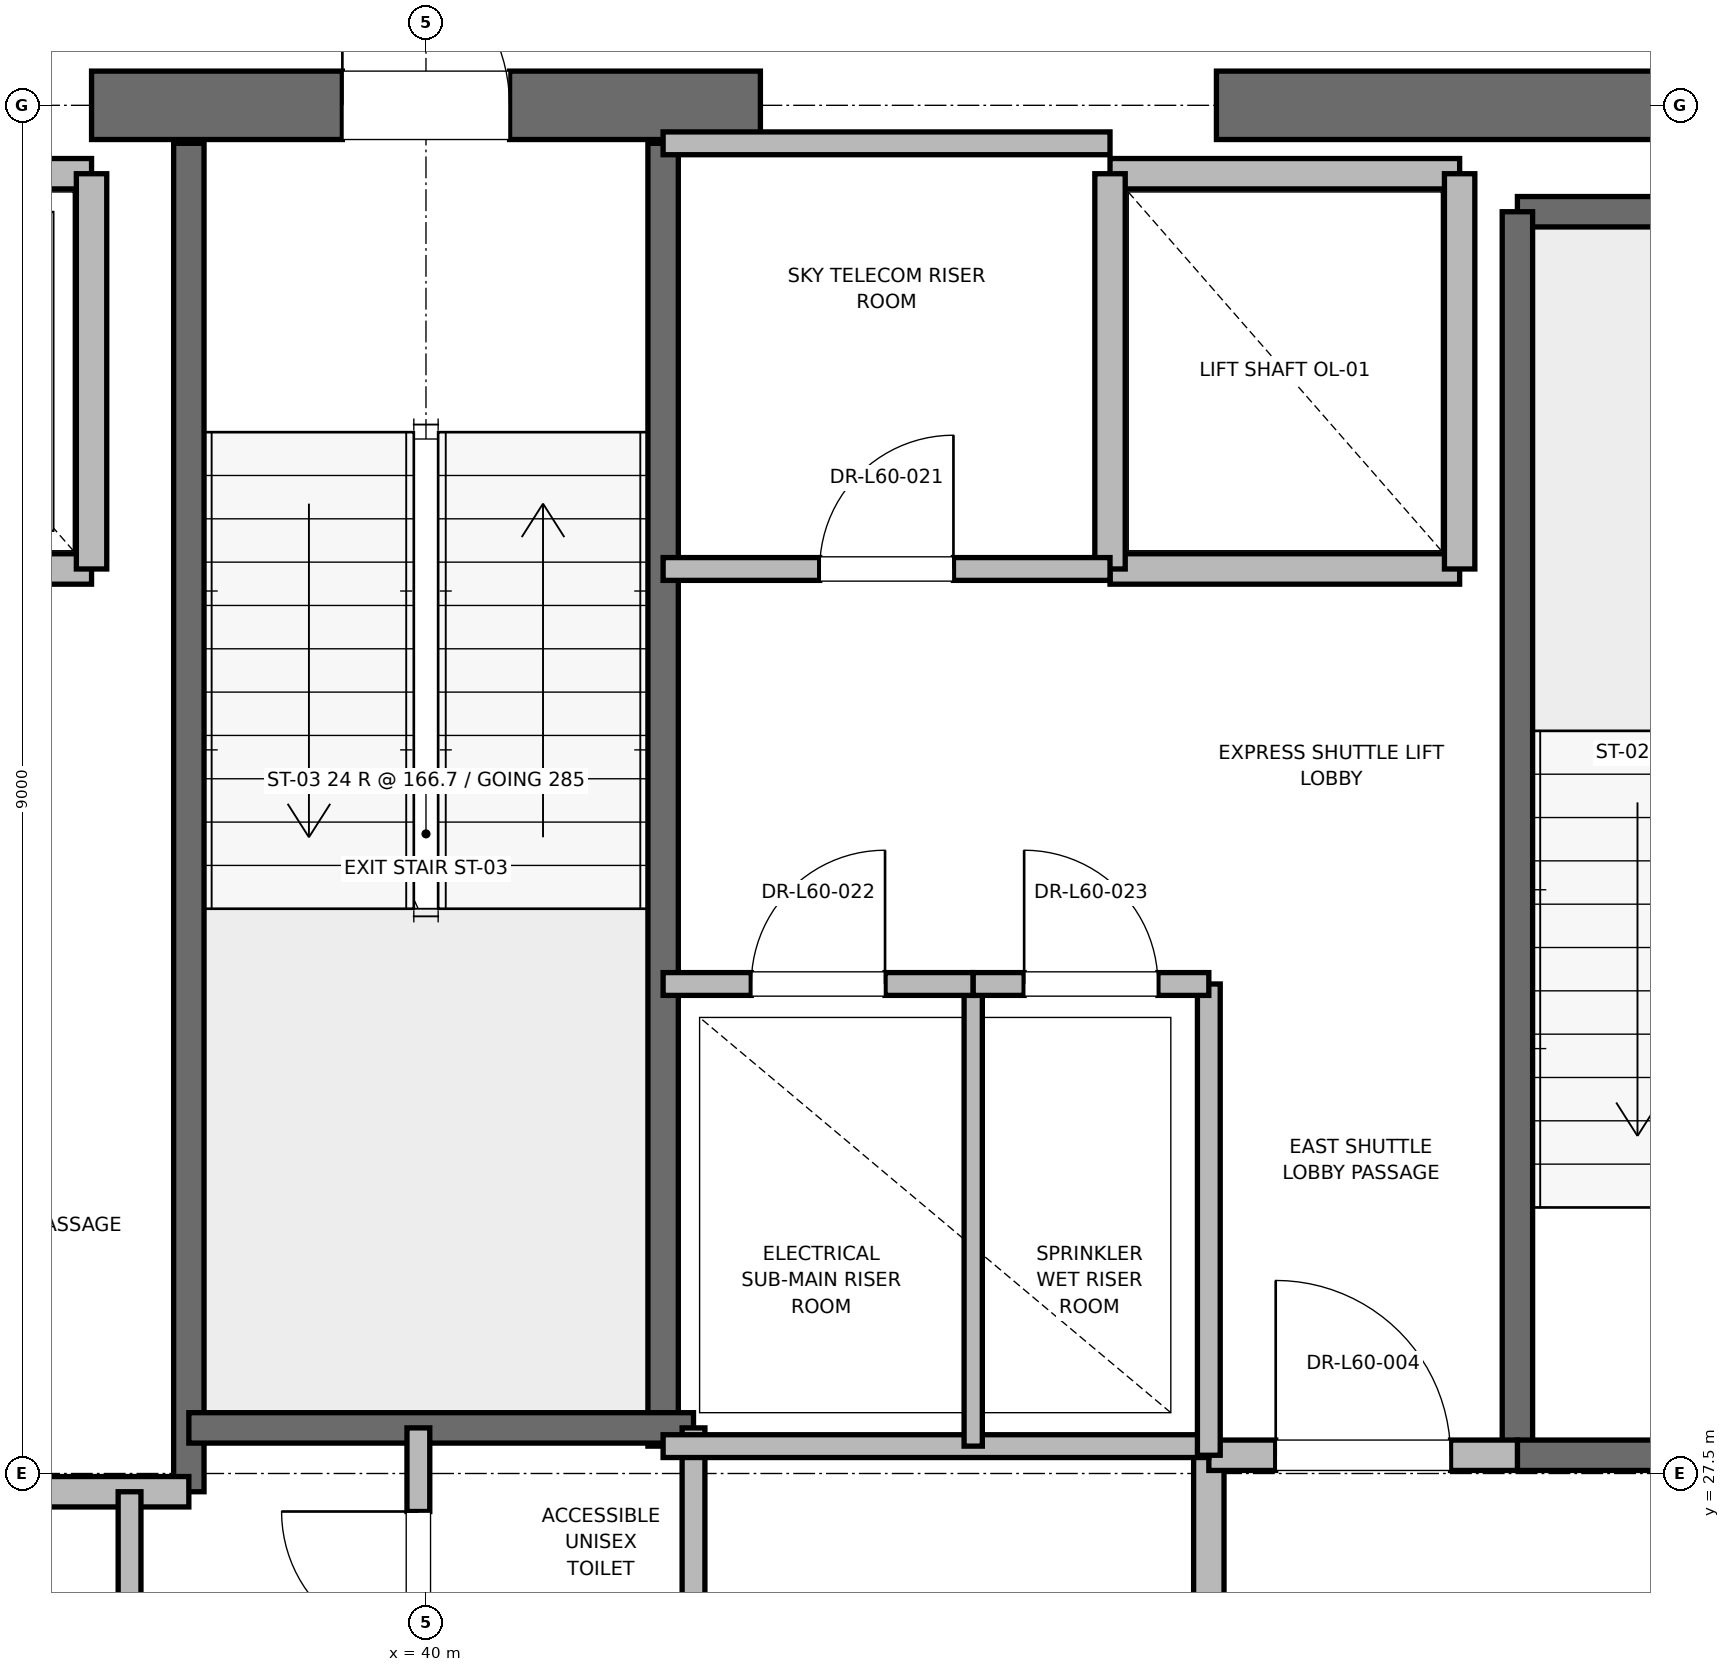
"""IFC4 building model, lengths in metres.
Left out: names, types, materials, properties, quantities, classifications, styles, units other than length and angle.
Written with IfcOpenShell. Run it as: python <this file> out.ifc"""

import sys

from ifc_helpers import new_model, si_unit, direction, frame, frame_2d, origin, place, context, subcontext, project, spatial, rectangle, extrude, element, fill, save


model = new_model("IFC4")
c1 = context("Model", 3, precision=1e-05, world=origin(), true_north=direction((0.0, 1.0)))
c2 = subcontext(c1, "Body", "Model", "MODEL_VIEW")
j1 = project(units=[si_unit("LENGTHUNIT", "METRE"), si_unit("PLANEANGLEUNIT", "RADIAN")], contexts=[c1])
p1 = place(None, origin())
s1 = spatial("IfcSite", under=j1, at=p1, CompositionType="ELEMENT")
p2 = place(p1, origin())
s2 = spatial("IfcBuilding", under=s1, at=p2, CompositionType="ELEMENT")
p3 = place(p2, frame((0.0, 0.0, 259.2)))
s3 = spatial("IfcBuildingStorey", under=s2, at=p3, CompositionType="ELEMENT", Elevation=259.2)
p4 = place(p3, frame((37.8, 36.5, 0.0), z_axis=(0.0, 0.0, 1.0), x_axis=(1.0, 0.0, 0.0)))
e1 = element("IfcWall", 1, at=p4, inside=s3, PredefinedType="SHEAR", context=c2, shape_type="SweptSolid", body=[
    extrude(rectangle(XDim=4.4, YDim=0.45, at=frame_2d((2.2, 0.0))), origin(), (0.0, 0.0, 1.0), 3.785),
])
p5 = place(p4, frame((1.65, 0.0, 0.0)))
e2 = element("IfcOpeningElement", 2, at=p5, cuts=e1, PredefinedType="OPENING", context=c2, shape_type="SweptSolid", body=[
    extrude(rectangle(XDim=1.1, YDim=2.15, at=frame_2d((0.55, 1.075))), frame((0.0, 0.225, 0.0), z_axis=(0.0, -1.0, 0.0), x_axis=(1.0, 0.0, 0.0)), (0.0, 0.0, 1.0), 0.45),
])
p6 = place(p3, frame((45.2, 36.5, 0.0), z_axis=(0.0, 0.0, 1.0), x_axis=(1.0, 0.0, 0.0)))
e3 = element("IfcWall", 3, at=p6, inside=s3, PredefinedType="SHEAR", context=c2, shape_type="SweptSolid", body=[
    extrude(rectangle(XDim=5.8, YDim=0.45, at=frame_2d((2.9, 0.0))), origin(), (0.0, 0.0, 1.0), 3.785),
])
p7 = place(p3, frame((47.18, 35.8, 0.0), z_axis=(0.0, 0.0, 1.0), x_axis=(1.0, 0.0, 0.0)))
e4 = element("IfcWall", 4, at=p7, inside=s3, PredefinedType="SOLIDWALL", context=c2, shape_type="SweptSolid", body=[
    extrude(rectangle(XDim=3.12, YDim=0.2, at=frame_2d((1.56, 0.0))), origin(), (0.0, 0.0, 1.0), 3.785),
])
p8 = place(p3, frame((47.18, 27.62, 0.0), z_axis=(0.0, 0.0, 1.0), x_axis=(0.0, 1.0, 0.0)))
e5 = element("IfcWall", 5, at=p8, inside=s3, PredefinedType="SOLIDWALL", context=c2, shape_type="SweptSolid", body=[
    extrude(rectangle(XDim=8.18, YDim=0.2, at=frame_2d((4.09, 0.0))), origin(), (0.0, 0.0, 1.0), 3.785),
])
p9 = place(p3, frame((47.18, 27.62, 0.0), z_axis=(0.0, 0.0, 1.0), x_axis=(1.0, 0.0, 0.0)))
e6 = element("IfcWall", 6, at=p9, inside=s3, PredefinedType="SOLIDWALL", context=c2, shape_type="SweptSolid", body=[
    extrude(rectangle(XDim=3.12, YDim=0.2, at=frame_2d((1.56, 0.0))), origin(), (0.0, 0.0, 1.0), 3.785),
])
p10 = place(p9, frame((1.01, 0.0, 0.0)))
e7 = element("IfcOpeningElement", 7, at=p10, cuts=e6, PredefinedType="OPENING", context=c2, shape_type="SweptSolid", body=[
    extrude(rectangle(XDim=1.1, YDim=2.15, at=frame_2d((0.55, 1.075))), frame((0.0, 0.1, 0.0), z_axis=(0.0, -1.0, 0.0), x_axis=(1.0, 0.0, 0.0)), (0.0, 0.0, 1.0), 0.2),
])
p11 = place(p3, frame((38.44, 27.38, 0.0), z_axis=(0.0, 0.0, 1.0), x_axis=(0.0, 1.0, 0.0)))
e8 = element("IfcWall", 8, at=p11, inside=s3, PredefinedType="SOLIDWALL", context=c2, shape_type="SweptSolid", body=[
    extrude(rectangle(XDim=8.87, YDim=0.2, at=frame_2d((4.435, 0.0))), origin(), (0.0, 0.0, 1.0), 3.785),
])
p12 = place(p3, frame((41.56, 27.68, 0.0), z_axis=(0.0, 0.0, 1.0), x_axis=(0.0, 1.0, 0.0)))
e9 = element("IfcWall", 9, at=p12, inside=s3, PredefinedType="SOLIDWALL", context=c2, shape_type="SweptSolid", body=[
    extrude(rectangle(XDim=8.57, YDim=0.2, at=frame_2d((4.285, 0.0))), origin(), (0.0, 0.0, 1.0), 3.785),
])
p13 = place(p3, frame((38.44, 27.8, 0.0), z_axis=(0.0, 0.0, 1.0), x_axis=(1.0, 0.0, 0.0)))
e10 = element("IfcWall", 10, at=p13, inside=s3, PredefinedType="SOLIDWALL", context=c2, shape_type="SweptSolid", body=[
    extrude(rectangle(XDim=3.32, YDim=0.2, at=frame_2d((1.66, 0.0))), origin(), (0.0, 0.0, 1.0), 3.785),
])
p14 = place(p3, frame((32.82, 27.38, 0.0), z_axis=(0.0, 0.0, 1.0), x_axis=(1.0, 0.0, 0.0)))
e11 = element("IfcWall", 11, at=p14, inside=s3, PredefinedType="PARTITIONING", context=c2, shape_type="SweptSolid", body=[
    extrude(rectangle(XDim=5.62, YDim=0.2, at=frame_2d((2.81, 0.0))), origin(), (0.0, 0.0, 1.0), 3.785),
])
p15 = place(p3, frame((45.15, 24.25, 0.0), z_axis=(0.0, 0.0, 1.0), x_axis=(0.0, 1.0, 0.0)))
e12 = element("IfcWall", 12, at=p15, inside=s3, PredefinedType="PARTITIONING", context=c2, shape_type="SweptSolid", body=[
    extrude(rectangle(XDim=3.37, YDim=0.2, at=frame_2d((1.685, 0.0))), origin(), (0.0, 0.0, 1.0), 3.785),
])
p16 = place(p3, frame((45.15, 27.62, 0.0), z_axis=(0.0, 0.0, 1.0), x_axis=(1.0, 0.0, 0.0)))
e13 = element("IfcWall", 13, at=p16, inside=s3, PredefinedType="PARTITIONING", context=c2, shape_type="SweptSolid", body=[
    extrude(rectangle(XDim=2.03, YDim=0.2, at=frame_2d((1.015, 0.0))), origin(), (0.0, 0.0, 1.0), 3.785),
])
p17 = place(p16, frame((0.44, 0.0, 0.0)))
e14 = element("IfcOpeningElement", 14, at=p17, cuts=e13, PredefinedType="OPENING", context=c2, shape_type="SweptSolid", body=[
    extrude(rectangle(XDim=1.15, YDim=2.2, at=frame_2d((0.575, 1.1))), frame((0.0, 0.1, 0.0), z_axis=(0.0, -1.0, 0.0), x_axis=(1.0, 0.0, 0.0)), (0.0, 0.0, 1.0), 0.2),
])
p18 = place(p3, frame((35.5, 33.45, 0.0), z_axis=(0.0, 0.0, 1.0), x_axis=(1.0, 0.0, 0.0)))
e15 = element("IfcWall", 15, at=p18, inside=s3, PredefinedType="SOLIDWALL", context=c2, shape_type="SweptSolid", body=[
    extrude(rectangle(XDim=2.3, YDim=0.2, at=frame_2d((1.15, 0.0))), origin(), (0.0, 0.0, 1.0), 3.785),
])
p19 = place(p18, frame((0.6, 0.0, 0.0)))
e16 = element("IfcOpeningElement", 16, at=p19, cuts=e15, PredefinedType="OPENING", context=c2, shape_type="SweptSolid", body=[
    extrude(rectangle(XDim=1.1, YDim=2.2, at=frame_2d((0.55, 1.1))), frame((0.0, 0.1, 0.0), z_axis=(0.0, -1.0, 0.0), x_axis=(1.0, 0.0, 0.0)), (0.0, 0.0, 1.0), 0.2),
])
p20 = place(p3, frame((37.8, 36.05, 0.0), z_axis=(0.0, 0.0, 1.0), x_axis=(-1.0, 0.0, 0.0)))
e17 = element("IfcWall", 17, at=p20, inside=s3, PredefinedType="SOLIDWALL", context=c2, shape_type="SweptSolid", body=[
    extrude(rectangle(XDim=2.3, YDim=0.2, at=frame_2d((1.15, 0.0))), origin(), (0.0, 0.0, 1.0), 2.865),
])
p21 = place(p3, frame((37.8, 33.45, 0.0), z_axis=(0.0, 0.0, 1.0), x_axis=(0.0, 1.0, 0.0)))
e18 = element("IfcWall", 18, at=p21, inside=s3, PredefinedType="SOLIDWALL", context=c2, shape_type="SweptSolid", body=[
    extrude(rectangle(XDim=2.6, YDim=0.2, at=frame_2d((1.3, 0.0))), origin(), (0.0, 0.0, 1.0), 2.865),
])
p22 = place(p3, frame((44.5, 33.45, 0.0), z_axis=(0.0, 0.0, 1.0), x_axis=(1.0, 0.0, 0.0)))
e19 = element("IfcWall", 19, at=p22, inside=s3, PredefinedType="SOLIDWALL", context=c2, shape_type="SweptSolid", body=[
    extrude(rectangle(XDim=2.3, YDim=0.2, at=frame_2d((1.15, 0.0))), origin(), (0.0, 0.0, 1.0), 3.785),
])
p23 = place(p3, frame((46.8, 36.05, 0.0), z_axis=(0.0, 0.0, 1.0), x_axis=(-1.0, 0.0, 0.0)))
e20 = element("IfcWall", 20, at=p23, inside=s3, PredefinedType="SOLIDWALL", context=c2, shape_type="SweptSolid", body=[
    extrude(rectangle(XDim=2.3, YDim=0.2, at=frame_2d((1.15, 0.0))), origin(), (0.0, 0.0, 1.0), 2.865),
])
p24 = place(p3, frame((44.5, 36.05, 0.0), z_axis=(0.0, 0.0, 1.0), x_axis=(0.0, -1.0, 0.0)))
e21 = element("IfcWall", 21, at=p24, inside=s3, PredefinedType="SOLIDWALL", context=c2, shape_type="SweptSolid", body=[
    extrude(rectangle(XDim=2.6, YDim=0.2, at=frame_2d((1.3, 0.0))), origin(), (0.0, 0.0, 1.0), 2.865),
])
p25 = place(p3, frame((46.8, 33.45, 0.0), z_axis=(0.0, 0.0, 1.0), x_axis=(0.0, 1.0, 0.0)))
e22 = element("IfcWall", 22, at=p25, inside=s3, PredefinedType="SOLIDWALL", context=c2, shape_type="SweptSolid", body=[
    extrude(rectangle(XDim=2.6, YDim=0.2, at=frame_2d((1.3, 0.0))), origin(), (0.0, 0.0, 1.0), 3.785),
])
p26 = place(p3, frame((41.76, 23.8, 0.0), z_axis=(0.0, 0.0, 1.0), x_axis=(0.0, 1.0, 0.0)))
e23 = element("IfcWall", 23, at=p26, inside=s3, PredefinedType="PARTITIONING", context=c2, shape_type="SweptSolid", body=[
    extrude(rectangle(XDim=4.0, YDim=0.15, at=frame_2d((2.0, 0.0))), origin(), (0.0, 0.0, 1.0), 2.85),
])
p27 = place(p3, frame((39.95, 25.8, 0.0), z_axis=(0.0, 0.0, 1.0), x_axis=(0.0, 1.0, 0.0)))
e24 = element("IfcWall", 24, at=p27, inside=s3, PredefinedType="PARTITIONING", context=c2, shape_type="SweptSolid", body=[
    extrude(rectangle(XDim=2.0, YDim=0.15, at=frame_2d((1.0, 0.0))), origin(), (0.0, 0.0, 1.0), 2.85),
])
p28 = place(p27, frame((0.55, 0.0, 0.0)))
e25 = element("IfcOpeningElement", 25, at=p28, cuts=e24, PredefinedType="OPENING", context=c2, shape_type="SweptSolid", body=[
    extrude(rectangle(XDim=0.9, YDim=2.1, at=frame_2d((0.45, 1.05))), frame((0.0, 0.075, 0.0), z_axis=(0.0, -1.0, 0.0), x_axis=(1.0, 0.0, 0.0)), (0.0, 0.0, 1.0), 0.15),
])
p29 = place(p3, frame((38.05, 24.5, 0.0), z_axis=(0.0, 0.0, 1.0), x_axis=(0.0, 1.0, 0.0)))
e26 = element("IfcWall", 26, at=p29, inside=s3, PredefinedType="PARTITIONING", context=c2, shape_type="SweptSolid", body=[
    extrude(rectangle(XDim=2.88, YDim=0.15, at=frame_2d((1.44, 0.0))), origin(), (0.0, 0.0, 1.0), 2.85),
])
p30 = place(p29, frame((0.94, 0.0, 0.0)))
e27 = element("IfcOpeningElement", 27, at=p30, cuts=e26, PredefinedType="OPENING", context=c2, shape_type="SweptSolid", body=[
    extrude(rectangle(XDim=1.0, YDim=2.15, at=frame_2d((0.5, 1.075))), frame((0.0, 0.075, 0.0), z_axis=(0.0, -1.0, 0.0), x_axis=(1.0, 0.0, 0.0)), (0.0, 0.0, 1.0), 0.15),
])
p31 = place(p3, frame((41.56, 27.68, 0.0), z_axis=(0.0, 0.0, 1.0), x_axis=(1.0, 0.0, 0.0)))
e28 = element("IfcWall", 28, at=p31, inside=s3, PredefinedType="PARTITIONING", context=c2, shape_type="SweptSolid", body=[
    extrude(rectangle(XDim=3.59, YDim=0.15, at=frame_2d((1.795, 0.0))), origin(), (0.0, 0.0, 1.0), 2.85),
])
p32 = place(p3, frame((45.15, 27.62, 0.0), z_axis=(0.0, 0.0, 1.0), x_axis=(0.0, 1.0, 0.0)))
e29 = element("IfcWall", 29, at=p32, inside=s3, PredefinedType="PARTITIONING", context=c2, shape_type="SweptSolid", body=[
    extrude(rectangle(XDim=3.1, YDim=0.15, at=frame_2d((1.55, 0.0))), origin(), (0.0, 0.0, 1.0), 2.85),
])
p33 = place(p3, frame((43.6, 27.68, 0.0), z_axis=(0.0, 0.0, 1.0), x_axis=(0.0, 1.0, 0.0)))
e30 = element("IfcWall", 30, at=p33, inside=s3, PredefinedType="PARTITIONING", context=c2, shape_type="SweptSolid", body=[
    extrude(rectangle(XDim=3.04, YDim=0.12, at=frame_2d((1.52, 0.0))), origin(), (0.0, 0.0, 1.0), 2.85),
])
p34 = place(p3, frame((41.56, 30.72, 0.0), z_axis=(0.0, 0.0, 1.0), x_axis=(1.0, 0.0, 0.0)))
e31 = element("IfcWall", 31, at=p34, inside=s3, PredefinedType="PARTITIONING", context=c2, shape_type="SweptSolid", body=[
    extrude(rectangle(XDim=2.04, YDim=0.15, at=frame_2d((1.02, 0.0))), origin(), (0.0, 0.0, 1.0), 2.85),
])
p35 = place(p34, frame((0.58, 0.0, 0.0)))
e32 = element("IfcOpeningElement", 32, at=p35, cuts=e31, PredefinedType="OPENING", context=c2, shape_type="SweptSolid", body=[
    extrude(rectangle(XDim=0.88, YDim=2.1, at=frame_2d((0.44, 1.05))), frame((0.0, 0.075, 0.0), z_axis=(0.0, -1.0, 0.0), x_axis=(1.0, 0.0, 0.0)), (0.0, 0.0, 1.0), 0.15),
])
p36 = place(p3, frame((43.6, 30.72, 0.0), z_axis=(0.0, 0.0, 1.0), x_axis=(1.0, 0.0, 0.0)))
e33 = element("IfcWall", 33, at=p36, inside=s3, PredefinedType="PARTITIONING", context=c2, shape_type="SweptSolid", body=[
    extrude(rectangle(XDim=1.55, YDim=0.15, at=frame_2d((0.775, 0.0))), origin(), (0.0, 0.0, 1.0), 2.85),
])
p37 = place(p36, frame((0.335, 0.0, 0.0)))
e34 = element("IfcOpeningElement", 34, at=p37, cuts=e33, PredefinedType="OPENING", context=c2, shape_type="SweptSolid", body=[
    extrude(rectangle(XDim=0.88, YDim=2.1, at=frame_2d((0.44, 1.05))), frame((0.0, 0.075, 0.0), z_axis=(0.0, -1.0, 0.0), x_axis=(1.0, 0.0, 0.0)), (0.0, 0.0, 1.0), 0.15),
])
p38 = place(p3, frame((41.56, 36.25, 0.0), z_axis=(0.0, 0.0, 1.0), x_axis=(1.0, 0.0, 0.0)))
e35 = element("IfcWall", 35, at=p38, inside=s3, PredefinedType="PARTITIONING", context=c2, shape_type="SweptSolid", body=[
    extrude(rectangle(XDim=2.94, YDim=0.15, at=frame_2d((1.47, 0.0))), origin(), (0.0, 0.0, 1.0), 2.85),
])
p39 = place(p3, frame((41.56, 33.45, 0.0), z_axis=(0.0, 0.0, 1.0), x_axis=(1.0, 0.0, 0.0)))
e36 = element("IfcWall", 36, at=p39, inside=s3, PredefinedType="PARTITIONING", context=c2, shape_type="SweptSolid", body=[
    extrude(rectangle(XDim=2.94, YDim=0.15, at=frame_2d((1.47, 0.0))), origin(), (0.0, 0.0, 1.0), 2.85),
])
p40 = place(p39, frame((1.03, 0.0, 0.0)))
e37 = element("IfcOpeningElement", 37, at=p40, cuts=e36, PredefinedType="OPENING", context=c2, shape_type="SweptSolid", body=[
    extrude(rectangle(XDim=0.88, YDim=2.1, at=frame_2d((0.44, 1.05))), frame((0.0, 0.075, 0.0), z_axis=(0.0, -1.0, 0.0), x_axis=(1.0, 0.0, 0.0)), (0.0, 0.0, 1.0), 0.15),
])
p41 = place(p5, origin())
e38 = element("IfcDoor", 38, at=p41, inside=s3, OperationType="SINGLE_SWING_LEFT", PredefinedType="DOOR", context=c2, shape_type="SweptSolid", body=[
    extrude(rectangle(XDim=1.1, YDim=2.15, at=frame_2d((0.55, 1.075))), frame((0.0, 0.025, 0.0), z_axis=(0.0, -1.0, 0.0), x_axis=(1.0, 0.0, 0.0)), (0.0, 0.0, 1.0), 0.05),
])
fill(e2, e38)
p42 = place(p17, origin())
e39 = element("IfcDoor", 39, at=p42, inside=s3, OperationType="SINGLE_SWING_LEFT", PredefinedType="DOOR", context=c2, shape_type="SweptSolid", body=[
    extrude(rectangle(XDim=1.15, YDim=2.2, at=frame_2d((0.575, 1.1))), frame((0.0, 0.025, 0.0), z_axis=(0.0, -1.0, 0.0), x_axis=(1.0, 0.0, 0.0)), (0.0, 0.0, 1.0), 0.05),
])
fill(e14, e39)
p43 = place(p28, origin())
e40 = element("IfcDoor", 40, at=p43, inside=s3, OperationType="SINGLE_SWING_RIGHT", PredefinedType="DOOR", context=c2, shape_type="SweptSolid", body=[
    extrude(rectangle(XDim=0.9, YDim=2.1, at=frame_2d((0.45, 1.05))), frame((0.0, 0.025, 0.0), z_axis=(0.0, -1.0, 0.0), x_axis=(1.0, 0.0, 0.0)), (0.0, 0.0, 1.0), 0.05),
])
fill(e25, e40)
p44 = place(p35, origin())
e41 = element("IfcDoor", 41, at=p44, inside=s3, OperationType="SINGLE_SWING_RIGHT", PredefinedType="DOOR", context=c2, shape_type="SweptSolid", body=[
    extrude(rectangle(XDim=0.88, YDim=2.1, at=frame_2d((0.44, 1.05))), frame((0.0, 0.025, 0.0), z_axis=(0.0, -1.0, 0.0), x_axis=(1.0, 0.0, 0.0)), (0.0, 0.0, 1.0), 0.05),
])
fill(e32, e41)
p45 = place(p37, origin())
e42 = element("IfcDoor", 42, at=p45, inside=s3, OperationType="SINGLE_SWING_LEFT", PredefinedType="DOOR", context=c2, shape_type="SweptSolid", body=[
    extrude(rectangle(XDim=0.88, YDim=2.1, at=frame_2d((0.44, 1.05))), frame((0.0, 0.025, 0.0), z_axis=(0.0, -1.0, 0.0), x_axis=(1.0, 0.0, 0.0)), (0.0, 0.0, 1.0), 0.05),
])
fill(e34, e42)
p46 = place(p40, origin())
e43 = element("IfcDoor", 43, at=p46, inside=s3, OperationType="SINGLE_SWING_RIGHT", PredefinedType="DOOR", context=c2, shape_type="SweptSolid", body=[
    extrude(rectangle(XDim=0.88, YDim=2.1, at=frame_2d((0.44, 1.05))), frame((0.0, 0.025, 0.0), z_axis=(0.0, -1.0, 0.0), x_axis=(1.0, 0.0, 0.0)), (0.0, 0.0, 1.0), 0.05),
])
fill(e37, e43)
save(model, sys.argv[1])
